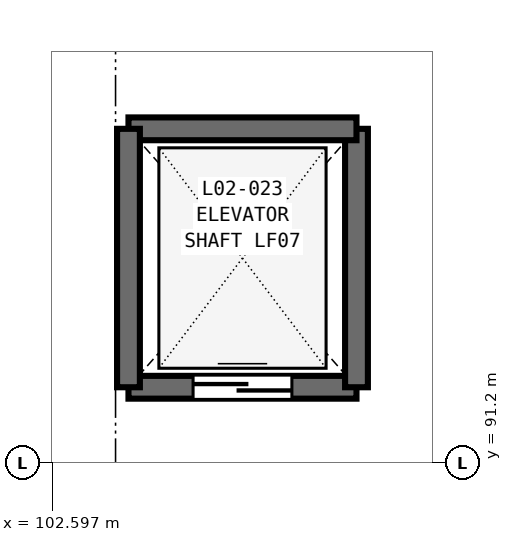
"""IFC4 building model, lengths in metres.
Left out: names, types, materials, properties, quantities, classifications, styles, units other than length and angle.
Written with IfcOpenShell. Run it as: python <this file> out.ifc"""

import sys

from ifc_helpers import new_model, si_unit, direction, frame, frame_2d, origin, place, context, subcontext, project, spatial, rectangle, extrude, element, fill, save


model = new_model("IFC4")
c1 = context("Model", 3, precision=1e-05, world=origin(), true_north=direction((0.0, 1.0)))
c2 = subcontext(c1, "Body", "Model", "MODEL_VIEW")
j1 = project(units=[si_unit("LENGTHUNIT", "METRE"), si_unit("PLANEANGLEUNIT", "RADIAN")], contexts=[c1])
p1 = place(None, origin())
s1 = spatial("IfcSite", under=j1, at=p1, CompositionType="ELEMENT")
p2 = place(p1, origin())
s2 = spatial("IfcBuilding", under=s1, at=p2, CompositionType="ELEMENT")
p3 = place(p2, frame((0.0, 0.0, 10.8)))
s3 = spatial("IfcBuildingStorey", under=s2, at=p3, CompositionType="ELEMENT", Elevation=10.8)
p4 = place(p3, frame((103.6, 92.2, 0.0), z_axis=(0.0, 0.0, 1.0), x_axis=(1.0, 0.0, 0.0)))
e1 = element("IfcWall", 1, at=p4, inside=s3, PredefinedType="SHEAR", context=c2, shape_type="SweptSolid", body=[
    extrude(rectangle(XDim=3.0, YDim=0.3, at=frame_2d((1.5, 0.0))), origin(), (0.0, 0.0, 1.0), 5.4),
])
p5 = place(p4, frame((0.85, 0.0, 0.0)))
e2 = element("IfcOpeningElement", 2, at=p5, cuts=e1, PredefinedType="OPENING", context=c2, shape_type="SweptSolid", body=[
    extrude(rectangle(XDim=1.3, YDim=2.2, at=frame_2d((0.65, 1.1))), frame((0.0, 0.16, 0.0), z_axis=(0.0, -1.0, 0.0), x_axis=(1.0, 0.0, 0.0)), (0.0, 0.0, 1.0), 0.32),
])
p6 = place(p3, frame((106.6, 92.2, 0.0), z_axis=(0.0, 0.0, 1.0), x_axis=(0.0, 1.0, 0.0)))
e3 = element("IfcWall", 3, at=p6, inside=s3, PredefinedType="SHEAR", context=c2, shape_type="SweptSolid", body=[
    extrude(rectangle(XDim=3.4, YDim=0.3, at=frame_2d((1.7, 0.0))), origin(), (0.0, 0.0, 1.0), 5.4),
])
p7 = place(p3, frame((106.6, 95.6, 0.0), z_axis=(0.0, 0.0, 1.0), x_axis=(-1.0, 0.0, 0.0)))
e4 = element("IfcWall", 4, at=p7, inside=s3, PredefinedType="SHEAR", context=c2, shape_type="SweptSolid", body=[
    extrude(rectangle(XDim=3.0, YDim=0.3, at=frame_2d((1.5, 0.0))), origin(), (0.0, 0.0, 1.0), 5.4),
])
p8 = place(p3, frame((103.6, 95.6, 0.0), z_axis=(0.0, 0.0, 1.0), x_axis=(0.0, -1.0, 0.0)))
e5 = element("IfcWall", 5, at=p8, inside=s3, PredefinedType="SHEAR", context=c2, shape_type="SweptSolid", body=[
    extrude(rectangle(XDim=3.4, YDim=0.3, at=frame_2d((1.7, 0.0))), origin(), (0.0, 0.0, 1.0), 5.4),
])
p9 = place(p5, origin())
e6 = element("IfcDoor", 6, at=p9, inside=s3, OperationType="DOUBLE_DOOR_SLIDING", PredefinedType="DOOR", context=c2, shape_type="SweptSolid", body=[
    extrude(rectangle(XDim=1.3, YDim=2.2, at=frame_2d((0.65, 1.1))), frame((0.0, 0.025, 0.0), z_axis=(0.0, -1.0, 0.0), x_axis=(1.0, 0.0, 0.0)), (0.0, 0.0, 1.0), 0.05),
])
fill(e2, e6)
save(model, sys.argv[1])
